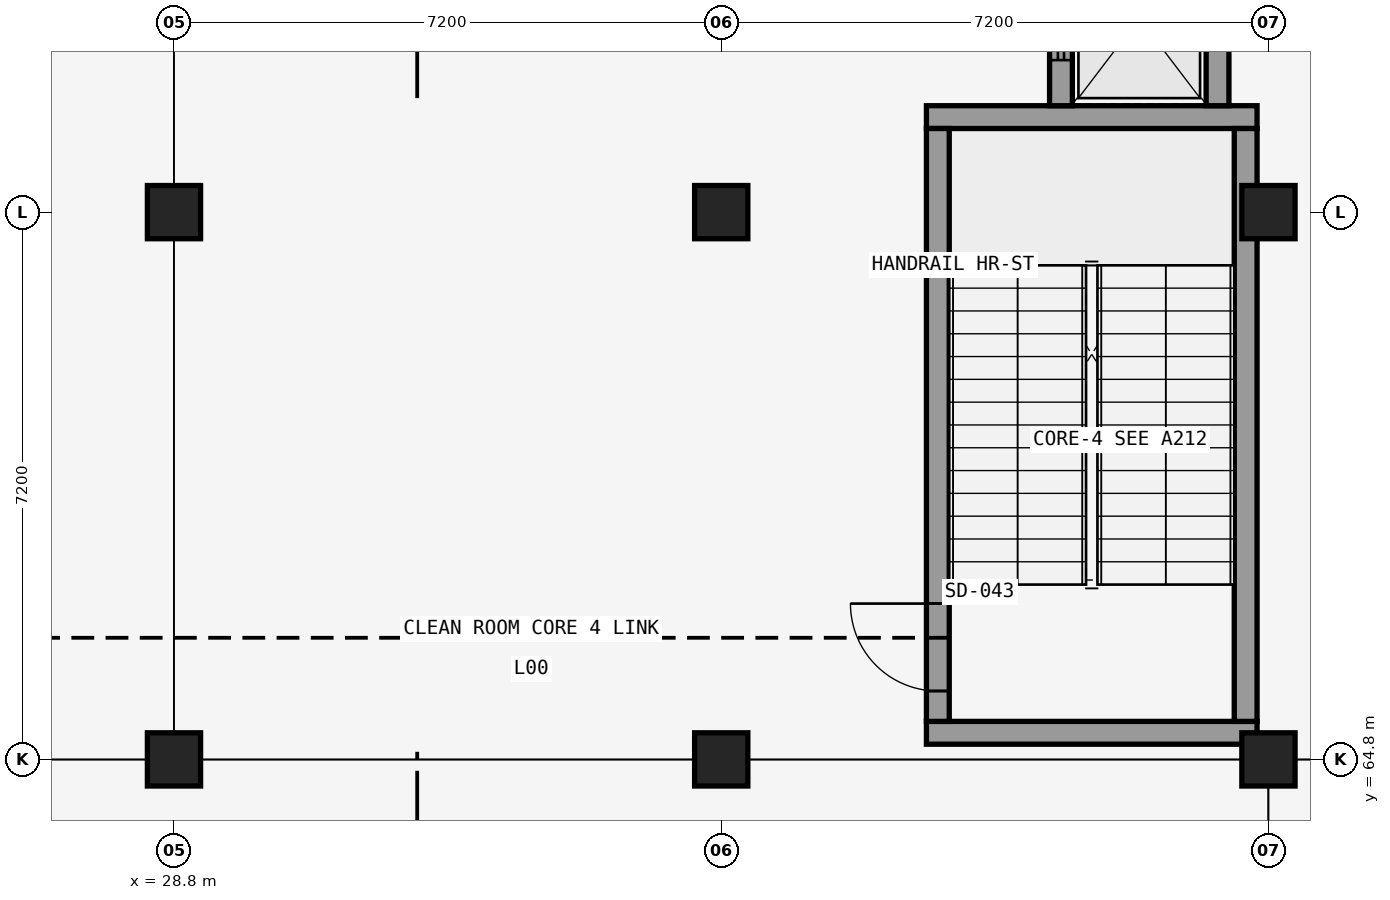
"""IFC4 building model, lengths in metres.
Left out: names, types, materials, properties, quantities, classifications, styles, units other than length and angle.
Written with IfcOpenShell. Run it as: python <this file> out.ifc"""

import sys

from ifc_helpers import new_model, si_unit, direction, frame, frame_2d, origin, origin_2d, place, context, subcontext, project, spatial, rectangle, extrude, element, fill, save


model = new_model("IFC4")
c1 = context("Model", 3, precision=1e-05, world=origin(), true_north=direction((0.0, 1.0)))
c2 = subcontext(c1, "Body", "Model", "MODEL_VIEW")
j1 = project(units=[si_unit("LENGTHUNIT", "METRE"), si_unit("PLANEANGLEUNIT", "RADIAN")], contexts=[c1])
p1 = place(None, origin())
s1 = spatial("IfcSite", under=j1, at=p1, CompositionType="ELEMENT")
p2 = place(p1, origin())
s2 = spatial("IfcBuilding", under=s1, at=p2, CompositionType="ELEMENT")
p3 = place(p2, origin())
s3 = spatial("IfcBuildingStorey", under=s2, at=p3, CompositionType="ELEMENT", Elevation=0.0)
for number, where, z_axis, x_axis in (
    (1, (28.8, 64.8, 0.0), (0.0, 0.0, 1.0), (1.0, 0.0, 0.0)),
    (2, (28.8, 72.0, 0.0), (0.0, 0.0, 1.0), (1.0, 0.0, 0.0)),
    (3, (36.0, 64.8, 0.0), (0.0, 0.0, 1.0), (1.0, 0.0, 0.0)),
    (4, (36.0, 72.0, 0.0), (0.0, 0.0, 1.0), (1.0, 0.0, 0.0)),
    (5, (43.2, 64.8, 0.0), (0.0, 0.0, 1.0), (1.0, 0.0, 0.0)),
    (6, (43.2, 72.0, 0.0), (0.0, 0.0, 1.0), (1.0, 0.0, 0.0)),
):
    element("IfcColumn", number, at=place(p3, frame(where, z_axis=z_axis, x_axis=x_axis)), inside=s3, PredefinedType="COLUMN", context=c2, shape_type="SweptSolid", body=[
        extrude(rectangle(XDim=0.7, YDim=0.7, at=origin_2d()), origin(), (0.0, 0.0, 1.0), 4.8),
    ])
for number, where, z_axis, x_axis in (
    (7, (38.7, 65.15, 0.0), (0.0, 0.0, 1.0), (1.0, 0.0, 0.0)),
    (8, (38.7, 73.25, 0.0), (0.0, 0.0, 1.0), (1.0, 0.0, 0.0)),
):
    element("IfcWall", number, at=place(p3, frame(where, z_axis=z_axis, x_axis=x_axis)), inside=s3, PredefinedType="SHEAR", context=c2, shape_type="SweptSolid", body=[
        extrude(rectangle(XDim=4.35, YDim=0.3, at=frame_2d((2.175, 0.0))), origin(), (0.0, 0.0, 1.0), 4.45),
    ])
p4 = place(p3, frame((38.85, 65.3, 0.0), z_axis=(0.0, 0.0, 1.0), x_axis=(0.0, 1.0, 0.0)))
e9 = element("IfcWall", 9, at=p4, inside=s3, PredefinedType="SHEAR", context=c2, shape_type="SweptSolid", body=[
    extrude(rectangle(XDim=7.8, YDim=0.3, at=frame_2d((3.9, 0.0))), origin(), (0.0, 0.0, 1.0), 4.45),
])
p5 = place(p4, frame((0.4, 0.0, 0.0)))
e10 = element("IfcOpeningElement", 10, at=p5, cuts=e9, PredefinedType="OPENING", context=c2, shape_type="SweptSolid", body=[
    extrude(rectangle(XDim=1.15, YDim=2.2, at=frame_2d((0.575, 1.1))), frame((0.0, 0.16, 0.0), z_axis=(0.0, -1.0, 0.0), x_axis=(1.0, 0.0, 0.0)), (0.0, 0.0, 1.0), 0.32),
])
p6 = place(p3, frame((42.9, 65.3, 0.0), z_axis=(0.0, 0.0, 1.0), x_axis=(0.0, 1.0, 0.0)))
e11 = element("IfcWall", 11, at=p6, inside=s3, PredefinedType="SHEAR", context=c2, shape_type="SweptSolid", body=[
    extrude(rectangle(XDim=7.8, YDim=0.3, at=frame_2d((3.9, 0.0))), origin(), (0.0, 0.0, 1.0), 4.45),
])
p7 = place(p3, frame((40.47, 73.4, 0.0), z_axis=(0.0, 0.0, 1.0), x_axis=(0.0, 1.0, 0.0)))
e12 = element("IfcWall", 12, at=p7, inside=s3, PredefinedType="SHEAR", context=c2, shape_type="SweptSolid", body=[
    extrude(rectangle(XDim=2.28, YDim=0.3, at=frame_2d((1.14, 0.0))), origin(), (0.0, 0.0, 1.0), 4.45),
])
p8 = place(p7, frame((0.6, 0.0, 0.0)))
e13 = element("IfcOpeningElement", 13, at=p8, cuts=e12, PredefinedType="OPENING", context=c2, shape_type="SweptSolid", body=[
    extrude(rectangle(XDim=1.1, YDim=2.2, at=frame_2d((0.55, 1.1))), frame((0.0, 0.16, 0.0), z_axis=(0.0, -1.0, 0.0), x_axis=(1.0, 0.0, 0.0)), (0.0, 0.0, 1.0), 0.32),
])
p9 = place(p3, frame((42.53, 73.4, 0.0), z_axis=(0.0, 0.0, 1.0), x_axis=(0.0, 1.0, 0.0)))
e14 = element("IfcWall", 14, at=p9, inside=s3, PredefinedType="SHEAR", context=c2, shape_type="SweptSolid", body=[
    extrude(rectangle(XDim=2.28, YDim=0.3, at=frame_2d((1.14, 0.0))), origin(), (0.0, 0.0, 1.0), 4.45),
])
p10 = place(p5, frame((1.15, 0.0, 0.0), z_axis=(0.0, 0.0, 1.0), x_axis=(-1.0, 0.0, 0.0)))
e15 = element("IfcDoor", 15, at=p10, inside=s3, OperationType="SINGLE_SWING_RIGHT", PredefinedType="DOOR", context=c2, shape_type="SweptSolid", body=[
    extrude(rectangle(XDim=1.15, YDim=2.2, at=frame_2d((0.575, 1.1))), frame((0.0, 0.025, 0.0), z_axis=(0.0, -1.0, 0.0), x_axis=(1.0, 0.0, 0.0)), (0.0, 0.0, 1.0), 0.05),
])
fill(e10, e15)
p11 = place(p8, origin())
e16 = element("IfcDoor", 16, at=p11, inside=s3, OperationType="SLIDING_TO_LEFT", PredefinedType="DOOR", context=c2, shape_type="SweptSolid", body=[
    extrude(rectangle(XDim=1.1, YDim=2.2, at=frame_2d((0.55, 1.1))), frame((0.0, 0.025, 0.0), z_axis=(0.0, -1.0, 0.0), x_axis=(1.0, 0.0, 0.0)), (0.0, 0.0, 1.0), 0.05),
])
fill(e13, e16)
save(model, sys.argv[1])
